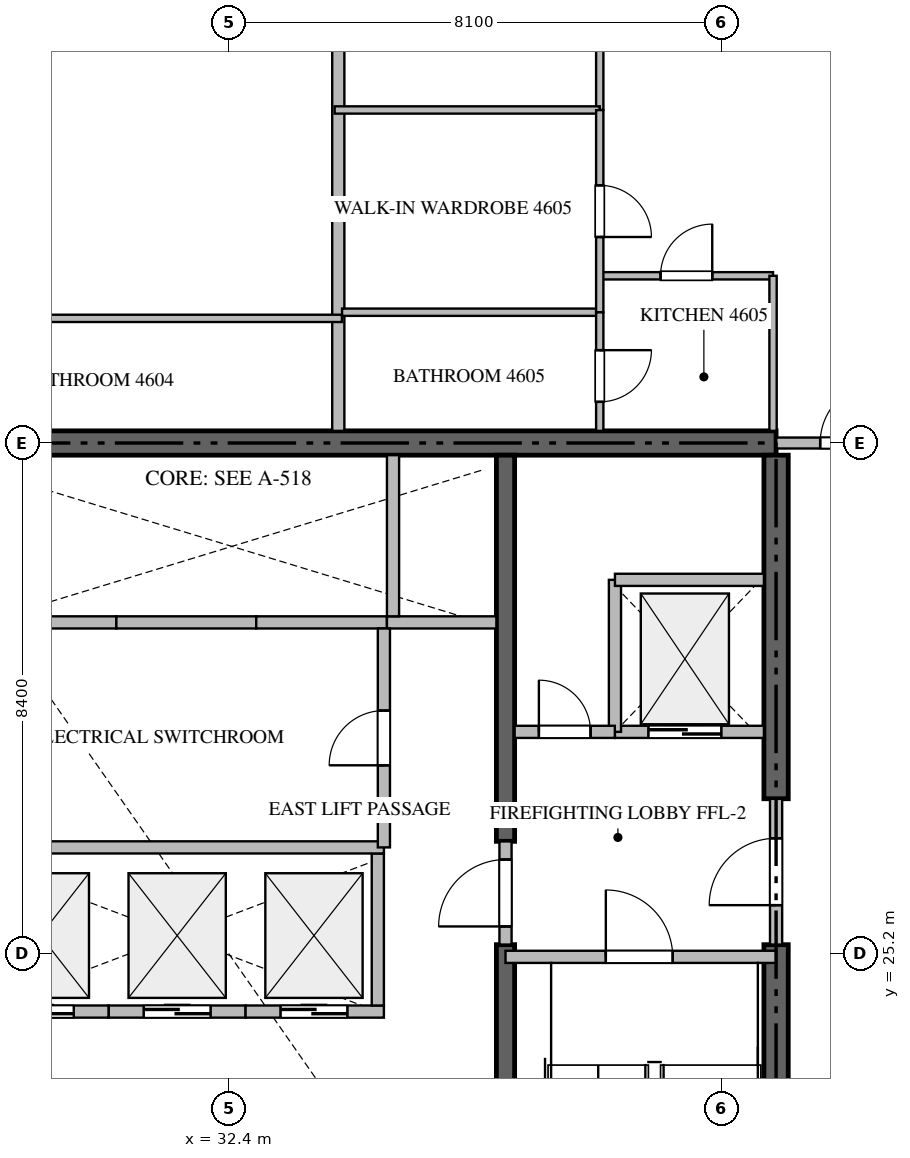
"""IFC4 building model, lengths in metres.
Left out: names, types, materials, properties, quantities, classifications, styles, units other than length and angle.
Written with IfcOpenShell. Run it as: python <this file> out.ifc"""

import sys

from ifc_helpers import new_model, si_unit, direction, frame, frame_2d, origin, place, context, subcontext, project, spatial, rectangle, extrude, source, transform, mapped, element, fill, save


model = new_model("IFC4")
c1 = context("Model", 3, precision=1e-05, world=origin(), true_north=direction((0.0, 1.0)))
c2 = subcontext(c1, "Body", "Model", "MODEL_VIEW")
j1 = project(units=[si_unit("LENGTHUNIT", "METRE"), si_unit("PLANEANGLEUNIT", "RADIAN")], contexts=[c1])
p1 = place(None, origin())
s1 = spatial("IfcSite", under=j1, at=p1, CompositionType="ELEMENT")
p2 = place(p1, origin())
s2 = spatial("IfcBuilding", under=s1, at=p2, CompositionType="ELEMENT")
p3 = place(p2, frame((0.0, 0.0, 183.9)))
s3 = spatial("IfcBuildingStorey", under=s2, at=p3, CompositionType="ELEMENT", Elevation=183.9)
p4 = place(p3, frame((41.4, 33.6, -0.26), z_axis=(0.0, 0.0, 1.0), x_axis=(-1.0, 0.0, 0.0)))
e1 = element("IfcWall", 1, at=p4, inside=s3, PredefinedType="SHEAR", context=c2, shape_type="SweptSolid", body=[
    extrude(rectangle(XDim=18.0, YDim=0.4, at=frame_2d((9.0, 0.0))), origin(), (0.0, 0.0, 1.0), 3.748),
])
p5 = place(p3, frame((41.4, 17.0, -0.26), z_axis=(0.0, 0.0, 1.0), x_axis=(0.0, 1.0, 0.0)))
e2 = element("IfcWall", 2, at=p5, inside=s3, PredefinedType="SHEAR", context=c2, shape_type="SweptSolid", body=[
    extrude(rectangle(XDim=8.35, YDim=0.4, at=frame_2d((4.175, 0.0))), origin(), (0.0, 0.0, 1.0), 3.748),
])
p6 = place(p3, frame((41.4, 27.75, -0.26), z_axis=(0.0, 0.0, 1.0), x_axis=(0.0, 1.0, 0.0)))
e3 = element("IfcWall", 3, at=p6, inside=s3, PredefinedType="SHEAR", context=c2, shape_type="SweptSolid", body=[
    extrude(rectangle(XDim=5.65, YDim=0.4, at=frame_2d((2.825, 0.0))), origin(), (0.0, 0.0, 1.0), 3.748),
])
p7 = place(p3, frame((36.95, 17.0, -0.26), z_axis=(0.0, 0.0, 1.0), x_axis=(0.0, 1.0, 0.0)))
e4 = element("IfcWall", 4, at=p7, inside=s3, PredefinedType="SHEAR", context=c2, shape_type="SweptSolid", body=[
    extrude(rectangle(XDim=8.35, YDim=0.3, at=frame_2d((4.175, 0.0))), origin(), (0.0, 0.0, 1.0), 3.748),
])
p8 = place(p3, frame((36.95, 27.05, -0.26), z_axis=(0.0, 0.0, 1.0), x_axis=(0.0, 1.0, 0.0)))
e5 = element("IfcWall", 5, at=p8, inside=s3, PredefinedType="SHEAR", context=c2, shape_type="SweptSolid", body=[
    extrude(rectangle(XDim=6.35, YDim=0.3, at=frame_2d((3.175, 0.0))), origin(), (0.0, 0.0, 1.0), 3.748),
])
p9 = place(p3, frame((36.95, 25.15, 0.0), z_axis=(0.0, 0.0, 1.0), x_axis=(1.0, 0.0, 0.0)))
e6 = element("IfcWall", 6, at=p9, inside=s3, PredefinedType="STANDARD", context=c2, shape_type="SweptSolid", body=[
    extrude(rectangle(XDim=4.45, YDim=0.2, at=frame_2d((2.225, 0.0))), origin(), (0.0, 0.0, 1.0), 3.49),
])
p10 = place(p9, frame((1.65, 0.0, 0.0)))
e7 = element("IfcOpeningElement", 7, at=p10, cuts=e6, PredefinedType="OPENING", context=c2, shape_type="SweptSolid", body=[
    extrude(rectangle(XDim=1.1, YDim=2.15, at=frame_2d((0.55, 1.075))), frame((0.0, 0.11, 0.0), z_axis=(0.0, -1.0, 0.0), x_axis=(1.0, 0.0, 0.0)), (0.0, 0.0, 1.0), 0.22),
])
p11 = place(p3, frame((38.75, 28.85, 0.0), z_axis=(0.0, 0.0, 1.0), x_axis=(1.0, 0.0, 0.0)))
e8 = element("IfcWall", 8, at=p11, inside=s3, PredefinedType="STANDARD", context=c2, shape_type="SweptSolid", body=[
    extrude(rectangle(XDim=2.45, YDim=0.2, at=frame_2d((1.225, 0.0))), origin(), (0.0, 0.0, 1.0), 3.49),
])
p12 = place(p11, frame((0.55, 0.0, 0.0)))
e9 = element("IfcOpeningElement", 9, at=p12, cuts=e8, PredefinedType="OPENING", context=c2, shape_type="SweptSolid", body=[
    extrude(rectangle(XDim=1.2, YDim=2.2, at=frame_2d((0.6, 1.1))), frame((0.0, 0.11, 0.0), z_axis=(0.0, -1.0, 0.0), x_axis=(1.0, 0.0, 0.0)), (0.0, 0.0, 1.0), 0.22),
])
p13 = place(p3, frame((28.0, 24.25, 0.0), z_axis=(0.0, 0.0, 1.0), x_axis=(1.0, 0.0, 0.0)))
e10 = element("IfcWall", 10, at=p13, inside=s3, PredefinedType="STANDARD", context=c2, shape_type="SweptSolid", body=[
    extrude(rectangle(XDim=2.425, YDim=0.2, at=frame_2d((1.212, 0.0))), origin(), (0.0, 0.0, 1.0), 3.49),
])
p14 = place(p13, frame((0.75, 0.0, 0.0)))
e11 = element("IfcOpeningElement", 11, at=p14, cuts=e10, PredefinedType="OPENING", context=c2, shape_type="SweptSolid", body=[
    extrude(rectangle(XDim=1.1, YDim=2.2, at=frame_2d((0.55, 1.1))), frame((0.0, 0.11, 0.0), z_axis=(0.0, -1.0, 0.0), x_axis=(1.0, 0.0, 0.0)), (0.0, 0.0, 1.0), 0.22),
])
p15 = place(p3, frame((30.425, 24.25, 0.0), z_axis=(0.0, 0.0, 1.0), x_axis=(1.0, 0.0, 0.0)))
e12 = element("IfcWall", 12, at=p15, inside=s3, PredefinedType="STANDARD", context=c2, shape_type="SweptSolid", body=[
    extrude(rectangle(XDim=2.25, YDim=0.2, at=frame_2d((1.125, 0.0))), origin(), (0.0, 0.0, 1.0), 3.49),
])
p16 = place(p15, frame((0.575, 0.0, 0.0)))
e13 = element("IfcOpeningElement", 13, at=p16, cuts=e12, PredefinedType="OPENING", context=c2, shape_type="SweptSolid", body=[
    extrude(rectangle(XDim=1.1, YDim=2.2, at=frame_2d((0.55, 1.1))), frame((0.0, 0.11, 0.0), z_axis=(0.0, -1.0, 0.0), x_axis=(1.0, 0.0, 0.0)), (0.0, 0.0, 1.0), 0.22),
])
p17 = place(p3, frame((32.675, 24.25, 0.0), z_axis=(0.0, 0.0, 1.0), x_axis=(1.0, 0.0, 0.0)))
e14 = element("IfcWall", 14, at=p17, inside=s3, PredefinedType="STANDARD", context=c2, shape_type="SweptSolid", body=[
    extrude(rectangle(XDim=2.275, YDim=0.2, at=frame_2d((1.137, 0.0))), origin(), (0.0, 0.0, 1.0), 3.49),
])
p18 = place(p17, frame((0.575, 0.0, 0.0)))
e15 = element("IfcOpeningElement", 15, at=p18, cuts=e14, PredefinedType="OPENING", context=c2, shape_type="SweptSolid", body=[
    extrude(rectangle(XDim=1.1, YDim=2.2, at=frame_2d((0.55, 1.1))), frame((0.0, 0.11, 0.0), z_axis=(0.0, -1.0, 0.0), x_axis=(1.0, 0.0, 0.0)), (0.0, 0.0, 1.0), 0.22),
])
p19 = place(p3, frame((34.85, 24.35, 0.0), z_axis=(0.0, 0.0, 1.0), x_axis=(0.0, 1.0, 0.0)))
e16 = element("IfcWall", 16, at=p19, inside=s3, PredefinedType="STANDARD", context=c2, shape_type="SweptSolid", body=[
    extrude(rectangle(XDim=2.5, YDim=0.2, at=frame_2d((1.25, 0.0))), origin(), (0.0, 0.0, 1.0), 3.49),
])
p20 = place(p3, frame((28.0, 30.65, 0.0), z_axis=(0.0, 0.0, 1.0), x_axis=(1.0, 0.0, 0.0)))
e17 = element("IfcWall", 17, at=p20, inside=s3, PredefinedType="STANDARD", context=c2, shape_type="SweptSolid", body=[
    extrude(rectangle(XDim=2.55, YDim=0.2, at=frame_2d((1.275, 0.0))), origin(), (0.0, 0.0, 1.0), 3.49),
])
p21 = place(p3, frame((30.55, 30.65, 0.0), z_axis=(0.0, 0.0, 1.0), x_axis=(1.0, 0.0, 0.0)))
e18 = element("IfcWall", 18, at=p21, inside=s3, PredefinedType="STANDARD", context=c2, shape_type="SweptSolid", body=[
    extrude(rectangle(XDim=2.3, YDim=0.2, at=frame_2d((1.15, 0.0))), origin(), (0.0, 0.0, 1.0), 3.49),
])
p22 = place(p3, frame((32.85, 30.65, 0.0), z_axis=(0.0, 0.0, 1.0), x_axis=(1.0, 0.0, 0.0)))
e19 = element("IfcWall", 19, at=p22, inside=s3, PredefinedType="STANDARD", context=c2, shape_type="SweptSolid", body=[
    extrude(rectangle(XDim=2.15, YDim=0.2, at=frame_2d((1.075, 0.0))), origin(), (0.0, 0.0, 1.0), 3.49),
])
p23 = place(p3, frame((35.0, 30.65, 0.0), z_axis=(0.0, 0.0, 1.0), x_axis=(1.0, 0.0, 0.0)))
e20 = element("IfcWall", 20, at=p23, inside=s3, PredefinedType="STANDARD", context=c2, shape_type="SweptSolid", body=[
    extrude(rectangle(XDim=1.8, YDim=0.2, at=frame_2d((0.9, 0.0))), origin(), (0.0, 0.0, 1.0), 3.49),
])
p24 = place(p3, frame((35.1, 30.75, 0.0), z_axis=(0.0, 0.0, 1.0), x_axis=(0.0, 1.0, 0.0)))
e21 = element("IfcWall", 21, at=p24, inside=s3, PredefinedType="STANDARD", context=c2, shape_type="SweptSolid", body=[
    extrude(rectangle(XDim=2.65, YDim=0.2, at=frame_2d((1.325, 0.0))), origin(), (0.0, 0.0, 1.0), 3.49),
])
p25 = place(p3, frame((38.75, 28.85, 0.0), z_axis=(0.0, 0.0, 1.0), x_axis=(0.0, 1.0, 0.0)))
e22 = element("IfcWall", 22, at=p25, inside=s3, PredefinedType="STANDARD", context=c2, shape_type="SweptSolid", body=[
    extrude(rectangle(XDim=2.5, YDim=0.2, at=frame_2d((1.25, 0.0))), origin(), (0.0, 0.0, 1.0), 3.49),
])
p26 = place(p3, frame((38.75, 31.35, 0.0), z_axis=(0.0, 0.0, 1.0), x_axis=(1.0, 0.0, 0.0)))
e23 = element("IfcWall", 23, at=p26, inside=s3, PredefinedType="STANDARD", context=c2, shape_type="SweptSolid", body=[
    extrude(rectangle(XDim=2.45, YDim=0.2, at=frame_2d((1.225, 0.0))), origin(), (0.0, 0.0, 1.0), 3.49),
])
p27 = place(p3, frame((37.1, 28.85, 0.0), z_axis=(0.0, 0.0, 1.0), x_axis=(1.0, 0.0, 0.0)))
e24 = element("IfcWall", 24, at=p27, inside=s3, PredefinedType="STANDARD", context=c2, shape_type="SweptSolid", body=[
    extrude(rectangle(XDim=1.648, YDim=0.2, at=frame_2d((0.824, 0.0))), origin(), (0.0, 0.0, 1.0), 3.49),
])
p28 = place(p27, frame((0.399, 0.0, 0.0)))
e25 = element("IfcOpeningElement", 25, at=p28, cuts=e24, PredefinedType="OPENING", context=c2, shape_type="SweptSolid", body=[
    extrude(rectangle(XDim=0.85, YDim=2.1, at=frame_2d((0.425, 1.05))), frame((0.0, 0.11, 0.0), z_axis=(0.0, -1.0, 0.0), x_axis=(1.0, 0.0, 0.0)), (0.0, 0.0, 1.0), 0.22),
])
p29 = place(p3, frame((41.4, 25.352, 0.0), z_axis=(0.0, 0.0, 1.0), x_axis=(0.0, 1.0, 0.0)))
e26 = element("IfcWall", 26, at=p29, inside=s3, PredefinedType="STANDARD", context=c2, shape_type="SweptSolid", body=[
    extrude(rectangle(XDim=2.396, YDim=0.2, at=frame_2d((1.198, 0.0))), origin(), (0.0, 0.0, 1.0), 3.49),
])
p30 = place(p29, frame((0.648, 0.0, 0.0)))
e27 = element("IfcOpeningElement", 27, at=p30, cuts=e26, PredefinedType="OPENING", context=c2, shape_type="SweptSolid", body=[
    extrude(rectangle(XDim=1.1, YDim=2.15, at=frame_2d((0.55, 1.075))), frame((0.0, 0.11, 0.0), z_axis=(0.0, -1.0, 0.0), x_axis=(1.0, 0.0, 0.0)), (0.0, 0.0, 1.0), 0.22),
])
p31 = place(p3, frame((36.95, 25.352, 0.0), z_axis=(0.0, 0.0, 1.0), x_axis=(0.0, 1.0, 0.0)))
e28 = element("IfcWall", 28, at=p31, inside=s3, PredefinedType="STANDARD", context=c2, shape_type="SweptSolid", body=[
    extrude(rectangle(XDim=1.696, YDim=0.2, at=frame_2d((0.848, 0.0))), origin(), (0.0, 0.0, 1.0), 3.49),
])
p32 = place(p31, frame((0.298, 0.0, 0.0)))
e29 = element("IfcOpeningElement", 29, at=p32, cuts=e28, PredefinedType="OPENING", context=c2, shape_type="SweptSolid", body=[
    extrude(rectangle(XDim=1.1, YDim=2.15, at=frame_2d((0.55, 1.075))), frame((0.0, 0.11, 0.0), z_axis=(0.0, -1.0, 0.0), x_axis=(1.0, 0.0, 0.0)), (0.0, 0.0, 1.0), 0.22),
])
p33 = place(p3, frame((28.0, 26.95, 0.0), z_axis=(0.0, 0.0, 1.0), x_axis=(1.0, 0.0, 0.0)))
e30 = element("IfcWall", 30, at=p33, inside=s3, PredefinedType="STANDARD", context=c2, shape_type="SweptSolid", body=[
    extrude(rectangle(XDim=6.95, YDim=0.2, at=frame_2d((3.475, 0.0))), origin(), (0.0, 0.0, 1.0), 3.49),
])
p34 = place(p3, frame((34.95, 26.95, 0.0), z_axis=(0.0, 0.0, 1.0), x_axis=(0.0, 1.0, 0.0)))
e31 = element("IfcWall", 31, at=p34, inside=s3, PredefinedType="STANDARD", context=c2, shape_type="SweptSolid", body=[
    extrude(rectangle(XDim=3.6, YDim=0.2, at=frame_2d((1.8, 0.0))), origin(), (0.0, 0.0, 1.0), 3.49),
])
p35 = place(p34, frame((1.35, 0.0, 0.0)))
e32 = element("IfcOpeningElement", 32, at=p35, cuts=e31, PredefinedType="OPENING", context=c2, shape_type="SweptSolid", body=[
    extrude(rectangle(XDim=0.9, YDim=2.1, at=frame_2d((0.45, 1.05))), frame((0.0, 0.11, 0.0), z_axis=(0.0, -1.0, 0.0), x_axis=(1.0, 0.0, 0.0)), (0.0, 0.0, 1.0), 0.22),
])
p36 = place(p3, frame((34.2, 33.8, 0.0), z_axis=(0.0, 0.0, 1.0), x_axis=(0.0, 1.0, 0.0)))
e33 = element("IfcWall", 33, at=p36, inside=s3, PredefinedType="PARTITIONING", context=c2, shape_type="SweptSolid", body=[
    extrude(rectangle(XDim=15.118, YDim=0.2, at=frame_2d((7.559, 0.0))), origin(), (0.0, 0.0, 1.0), 3.49),
])
p37 = place(p3, frame((41.402, 33.6, 0.0), z_axis=(0.0, 0.0, 1.0), x_axis=(1.0, 0.0, 0.0)))
e34 = element("IfcWall", 34, at=p37, inside=s3, PredefinedType="PARTITIONING", context=c2, shape_type="SweptSolid", body=[
    extrude(rectangle(XDim=2.446, YDim=0.18, at=frame_2d((1.223, 0.0))), origin(), (0.0, 0.0, 1.0), 3.49),
])
p38 = place(p37, frame((0.723, 0.0, 0.0)))
e35 = element("IfcOpeningElement", 35, at=p38, cuts=e34, PredefinedType="OPENING", context=c2, shape_type="SweptSolid", body=[
    extrude(rectangle(XDim=1.0, YDim=2.15, at=frame_2d((0.5, 1.075))), frame((0.0, 0.1, 0.0), z_axis=(0.0, -1.0, 0.0), x_axis=(1.0, 0.0, 0.0)), (0.0, 0.0, 1.0), 0.2),
])
p39 = place(p3, frame((26.3, 35.65, 0.0), z_axis=(0.0, 0.0, 1.0), x_axis=(1.0, 0.0, 0.0)))
e36 = element("IfcWall", 36, at=p39, inside=s3, PredefinedType="PARTITIONING", context=c2, shape_type="SweptSolid", body=[
    extrude(rectangle(XDim=7.96, YDim=0.12, at=frame_2d((3.98, 0.0))), origin(), (0.0, 0.0, 1.0), 3.49),
])
p40 = place(p3, frame((38.5, 36.35, 0.0), z_axis=(0.0, 0.0, 1.0), x_axis=(1.0, 0.0, 0.0)))
e37 = element("IfcWall", 37, at=p40, inside=s3, PredefinedType="PARTITIONING", context=c2, shape_type="SweptSolid", body=[
    extrude(rectangle(XDim=2.85, YDim=0.12, at=frame_2d((1.425, 0.0))), origin(), (0.0, 0.0, 1.0), 3.49),
])
p41 = place(p40, frame((1.0, 0.0, 0.0)))
e38 = element("IfcOpeningElement", 38, at=p41, cuts=e37, PredefinedType="OPENING", context=c2, shape_type="SweptSolid", body=[
    extrude(rectangle(XDim=0.85, YDim=2.1, at=frame_2d((0.425, 1.05))), frame((0.0, 0.07, 0.0), z_axis=(0.0, -1.0, 0.0), x_axis=(1.0, 0.0, 0.0)), (0.0, 0.0, 1.0), 0.14),
])
p42 = place(p3, frame((41.35, 36.35, 0.0), z_axis=(0.0, 0.0, 1.0), x_axis=(0.0, -1.0, 0.0)))
e39 = element("IfcWall", 39, at=p42, inside=s3, PredefinedType="PARTITIONING", context=c2, shape_type="SweptSolid", body=[
    extrude(rectangle(XDim=2.55, YDim=0.12, at=frame_2d((1.275, 0.0))), origin(), (0.0, 0.0, 1.0), 3.49),
])
p43 = place(p3, frame((38.5, 48.905, 0.0), z_axis=(0.0, 0.0, 1.0), x_axis=(0.0, -1.0, 0.0)))
e40 = element("IfcWall", 40, at=p43, inside=s3, PredefinedType="PARTITIONING", context=c2, shape_type="SweptSolid", body=[
    extrude(rectangle(XDim=9.828, YDim=0.12, at=frame_2d((4.914, 0.0))), origin(), (0.0, 0.0, 1.0), 3.49),
])
p44 = place(p43, frame((4.91, 0.0, 0.0)))
e41 = element("IfcOpeningElement", 41, at=p44, cuts=e40, PredefinedType="OPENING", context=c2, shape_type="SweptSolid", body=[
    extrude(rectangle(XDim=0.9, YDim=2.1, at=frame_2d((0.45, 1.05))), frame((0.0, 0.07, 0.0), z_axis=(0.0, -1.0, 0.0), x_axis=(1.0, 0.0, 0.0)), (0.0, 0.0, 1.0), 0.14),
])
p45 = place(p3, frame((34.14, 39.077, 0.0), z_axis=(0.0, 0.0, 1.0), x_axis=(1.0, 0.0, 0.0)))
e42 = element("IfcWall", 42, at=p45, inside=s3, PredefinedType="PARTITIONING", context=c2, shape_type="SweptSolid", body=[
    extrude(rectangle(XDim=4.36, YDim=0.12, at=frame_2d((2.18, 0.0))), origin(), (0.0, 0.0, 1.0), 3.49),
])
p46 = place(p3, frame((34.262, 35.751, 0.0), z_axis=(0.0, 0.0, 1.0), x_axis=(1.0, 0.0, 0.0)))
e43 = element("IfcWall", 43, at=p46, inside=s3, PredefinedType="PARTITIONING", context=c2, shape_type="SweptSolid", body=[
    extrude(rectangle(XDim=4.238, YDim=0.12, at=frame_2d((2.119, 0.0))), origin(), (0.0, 0.0, 1.0), 3.49),
])
p47 = place(p3, frame((38.5, 39.075, 0.0), z_axis=(0.0, 0.0, 1.0), x_axis=(0.0, -1.0, 0.0)))
e44 = element("IfcWall", 44, at=p47, inside=s3, PredefinedType="PARTITIONING", context=c2, shape_type="SweptSolid", body=[
    extrude(rectangle(XDim=3.324, YDim=0.12, at=frame_2d((1.662, 0.0))), origin(), (0.0, 0.0, 1.0), 3.49),
])
p48 = place(p47, frame((1.237, 0.0, 0.0)))
e45 = element("IfcOpeningElement", 45, at=p48, cuts=e44, PredefinedType="OPENING", context=c2, shape_type="SweptSolid", body=[
    extrude(rectangle(XDim=0.85, YDim=2.1, at=frame_2d((0.425, 1.05))), frame((0.0, 0.07, 0.0), z_axis=(0.0, -1.0, 0.0), x_axis=(1.0, 0.0, 0.0)), (0.0, 0.0, 1.0), 0.14),
])
p49 = place(p3, frame((38.5, 35.749, 0.0), z_axis=(0.0, 0.0, 1.0), x_axis=(0.0, -1.0, 0.0)))
e46 = element("IfcWall", 46, at=p49, inside=s3, PredefinedType="PARTITIONING", context=c2, shape_type="SweptSolid", body=[
    extrude(rectangle(XDim=1.949, YDim=0.12, at=frame_2d((0.975, 0.0))), origin(), (0.0, 0.0, 1.0), 3.49),
])
p50 = place(p49, frame((0.622, 0.0, 0.0)))
e47 = element("IfcOpeningElement", 47, at=p50, cuts=e46, PredefinedType="OPENING", context=c2, shape_type="SweptSolid", body=[
    extrude(rectangle(XDim=0.85, YDim=2.1, at=frame_2d((0.425, 1.05))), frame((0.0, 0.07, 0.0), z_axis=(0.0, -1.0, 0.0), x_axis=(1.0, 0.0, 0.0)), (0.0, 0.0, 1.0), 0.14),
])
m1 = source(origin(), c2, "Body", "SweptSolid", [
    extrude(rectangle(XDim=1.1, YDim=2.15, at=frame_2d((0.55, 1.075))), frame((0.0, 0.025, 0.0), z_axis=(0.0, -1.0, 0.0), x_axis=(1.0, 0.0, 0.0)), (0.0, 0.0, 1.0), 0.05),
])
p51 = place(p10, origin())
e48 = element("IfcDoor", 48, at=p51, inside=s3, OperationType="SINGLE_SWING_LEFT", PredefinedType="DOOR", context=c2, shape_type="MappedRepresentation", body=[
    mapped(m1, transform((0.0, 0.0, 0.0), scale=1.0)),
])
fill(e7, e48)
m2 = source(origin(), c2, "Body", "SweptSolid", [
    extrude(rectangle(XDim=1.2, YDim=2.2, at=frame_2d((0.6, 1.1))), frame((0.0, 0.025, 0.0), z_axis=(0.0, -1.0, 0.0), x_axis=(1.0, 0.0, 0.0)), (0.0, 0.0, 1.0), 0.05),
])
p52 = place(p12, origin())
e49 = element("IfcDoor", 49, at=p52, inside=s3, OperationType="DOUBLE_DOOR_SLIDING", PredefinedType="DOOR", context=c2, shape_type="MappedRepresentation", body=[
    mapped(m2, transform((0.0, 0.0, 0.0), scale=1.0)),
])
fill(e9, e49)
m3 = source(origin(), c2, "Body", "SweptSolid", [
    extrude(rectangle(XDim=1.1, YDim=2.2, at=frame_2d((0.55, 1.1))), frame((0.0, 0.025, 0.0), z_axis=(0.0, -1.0, 0.0), x_axis=(1.0, 0.0, 0.0)), (0.0, 0.0, 1.0), 0.05),
])
p53 = place(p14, origin())
e50 = element("IfcDoor", 50, at=p53, inside=s3, OperationType="DOUBLE_DOOR_SLIDING", PredefinedType="DOOR", context=c2, shape_type="MappedRepresentation", body=[
    mapped(m3, transform((0.0, 0.0, 0.0), scale=1.0)),
])
fill(e11, e50)
p54 = place(p16, origin())
e51 = element("IfcDoor", 51, at=p54, inside=s3, OperationType="DOUBLE_DOOR_SLIDING", PredefinedType="DOOR", context=c2, shape_type="MappedRepresentation", body=[
    mapped(m3, transform((0.0, 0.0, 0.0), scale=1.0)),
])
fill(e13, e51)
p55 = place(p18, origin())
e52 = element("IfcDoor", 52, at=p55, inside=s3, OperationType="DOUBLE_DOOR_SLIDING", PredefinedType="DOOR", context=c2, shape_type="MappedRepresentation", body=[
    mapped(m3, transform((0.0, 0.0, 0.0), scale=1.0)),
])
fill(e15, e52)
m4 = source(origin(), c2, "Body", "SweptSolid", [
    extrude(rectangle(XDim=0.85, YDim=2.1, at=frame_2d((0.425, 1.05))), frame((0.0, 0.025, 0.0), z_axis=(0.0, -1.0, 0.0), x_axis=(1.0, 0.0, 0.0)), (0.0, 0.0, 1.0), 0.05),
])
p56 = place(p28, origin())
e53 = element("IfcDoor", 53, at=p56, inside=s3, OperationType="SINGLE_SWING_LEFT", PredefinedType="DOOR", context=c2, shape_type="MappedRepresentation", body=[
    mapped(m4, transform((0.0, 0.0, 0.0), scale=1.0)),
])
fill(e25, e53)
p57 = place(p30, origin())
e54 = element("IfcDoor", 54, at=p57, inside=s3, OperationType="SINGLE_SWING_LEFT", PredefinedType="DOOR", context=c2, shape_type="MappedRepresentation", body=[
    mapped(m1, transform((0.0, 0.0, 0.0), scale=1.0)),
])
fill(e27, e54)
p58 = place(p32, origin())
e55 = element("IfcDoor", 55, at=p58, inside=s3, OperationType="SINGLE_SWING_LEFT", PredefinedType="DOOR", context=c2, shape_type="MappedRepresentation", body=[
    mapped(m1, transform((0.0, 0.0, 0.0), scale=1.0)),
])
fill(e29, e55)
m5 = source(origin(), c2, "Body", "SweptSolid", [
    extrude(rectangle(XDim=0.9, YDim=2.1, at=frame_2d((0.45, 1.05))), frame((0.0, 0.025, 0.0), z_axis=(0.0, -1.0, 0.0), x_axis=(1.0, 0.0, 0.0)), (0.0, 0.0, 1.0), 0.05),
])
p59 = place(p35, origin())
e56 = element("IfcDoor", 56, at=p59, inside=s3, OperationType="SINGLE_SWING_LEFT", PredefinedType="DOOR", context=c2, shape_type="MappedRepresentation", body=[
    mapped(m5, transform((0.0, 0.0, 0.0), scale=1.0)),
])
fill(e32, e56)
m6 = source(origin(), c2, "Body", "SweptSolid", [
    extrude(rectangle(XDim=1.0, YDim=2.15, at=frame_2d((0.5, 1.075))), frame((0.0, 0.025, 0.0), z_axis=(0.0, -1.0, 0.0), x_axis=(1.0, 0.0, 0.0)), (0.0, 0.0, 1.0), 0.05),
])
p60 = place(p38, origin())
e57 = element("IfcDoor", 57, at=p60, inside=s3, OperationType="SINGLE_SWING_RIGHT", PredefinedType="DOOR", context=c2, shape_type="MappedRepresentation", body=[
    mapped(m6, transform((0.0, 0.0, 0.0), scale=1.0)),
])
fill(e35, e57)
p61 = place(p41, origin())
e58 = element("IfcDoor", 58, at=p61, inside=s3, OperationType="SINGLE_SWING_RIGHT", PredefinedType="DOOR", context=c2, shape_type="MappedRepresentation", body=[
    mapped(m4, transform((0.0, 0.0, 0.0), scale=1.0)),
])
fill(e38, e58)
p62 = place(p48, origin())
e59 = element("IfcDoor", 59, at=p62, inside=s3, OperationType="SINGLE_SWING_RIGHT", PredefinedType="DOOR", context=c2, shape_type="MappedRepresentation", body=[
    mapped(m4, transform((0.0, 0.0, 0.0), scale=1.0)),
])
fill(e45, e59)
p63 = place(p50, origin())
e60 = element("IfcDoor", 60, at=p63, inside=s3, OperationType="SINGLE_SWING_LEFT", PredefinedType="DOOR", context=c2, shape_type="MappedRepresentation", body=[
    mapped(m4, transform((0.0, 0.0, 0.0), scale=1.0)),
])
fill(e47, e60)
save(model, sys.argv[1])
